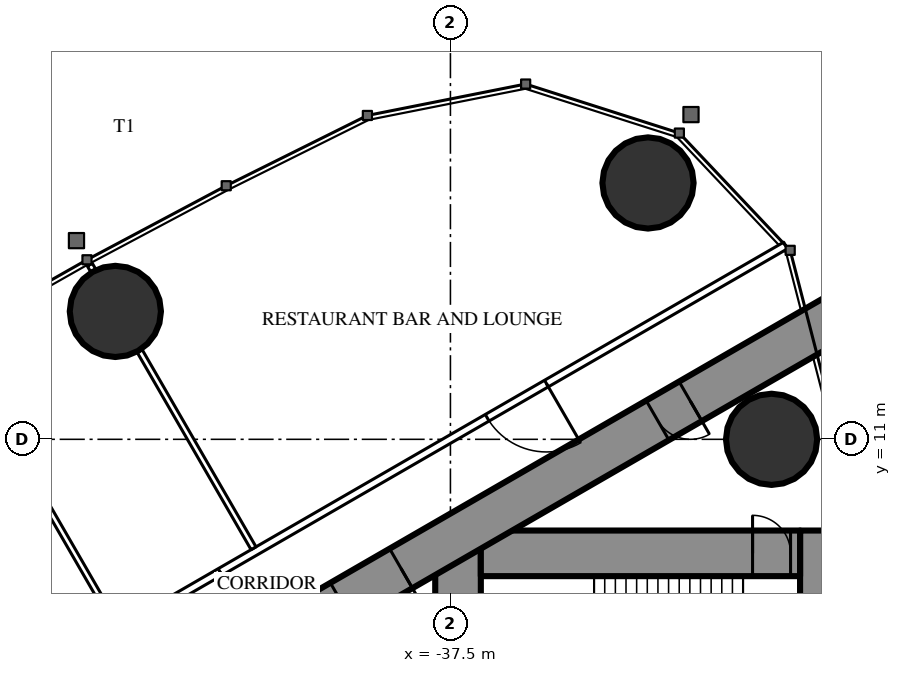
"""IFC4 building model, lengths in metres.
Left out: names, types, materials, properties, quantities, classifications, styles, units other than length and angle.
Written with IfcOpenShell. Run it as: python <this file> out.ifc"""

import sys

from ifc_helpers import new_model, si_unit, direction, frame, frame_2d, origin, origin_2d, place, context, subcontext, project, spatial, rectangle, circle, extrude, element, fill, save


model = new_model("IFC4")
c1 = context("Model", 3, precision=1e-05, world=origin(), true_north=direction((0.0, 1.0)))
c2 = subcontext(c1, "Body", "Model", "MODEL_VIEW")
j1 = project(units=[si_unit("LENGTHUNIT", "METRE"), si_unit("PLANEANGLEUNIT", "RADIAN")], contexts=[c1])
p1 = place(None, origin())
s1 = spatial("IfcSite", under=j1, at=p1, CompositionType="ELEMENT")
p2 = place(p1, origin())
s2 = spatial("IfcBuilding", under=s1, at=p2, CompositionType="ELEMENT")
p3 = place(p2, frame((0.0, 0.0, 251.9)))
s3 = spatial("IfcBuildingStorey", under=s2, at=p3, CompositionType="ELEMENT", Elevation=251.9)
for number, where, z_axis, x_axis in (
    (1, (-32.301, 17.745, 0.0), (0.0, 0.0, 1.0), (1.0, 0.0, 0.0)),
    (2, (-29.05, 11.0, 0.0), (0.0, 0.0, 1.0), (1.0, 0.0, 0.0)),
    (3, (-46.317, 14.365, 0.0), (0.0, 0.0, 1.0), (1.0, 0.0, 0.0)),
):
    element("IfcColumn", number, at=place(p3, frame(where, z_axis=z_axis, x_axis=x_axis)), inside=s3, PredefinedType="COLUMN", context=c2, shape_type="SweptSolid", body=[
        extrude(circle(Radius=1.2, at=origin_2d()), origin(), (0.0, 0.0, 1.0), 5.4),
    ])
p4 = place(p3, frame((-27.9, 8.6, 0.0), z_axis=(0.0, 0.0, 1.0), x_axis=(0.0, -1.0, 0.0)))
e4 = element("IfcWall", 4, at=p4, inside=s3, PredefinedType="SHEAR", context=c2, shape_type="SweptSolid", body=[
    extrude(rectangle(XDim=17.2, YDim=0.8, at=frame_2d((8.6, 0.0))), origin(), (0.0, 0.0, 1.0), 5.4),
])
p5 = place(p4, frame((6.95, 0.0, 0.0)))
e5 = element("IfcOpeningElement", 5, at=p5, cuts=e4, PredefinedType="OPENING", context=c2, shape_type="SweptSolid", body=[
    extrude(rectangle(XDim=0.9, YDim=2.2, at=frame_2d((0.45, 1.1))), frame((0.0, 0.41, 0.0), z_axis=(0.0, -1.0, 0.0), x_axis=(1.0, 0.0, 0.0)), (0.0, 0.0, 1.0), 0.82),
])
p6 = place(p3, frame((-37.3, 8.6, 0.0), z_axis=(0.0, 0.0, 1.0), x_axis=(0.0, -1.0, 0.0)))
e6 = element("IfcWall", 6, at=p6, inside=s3, PredefinedType="SHEAR", context=c2, shape_type="SweptSolid", body=[
    extrude(rectangle(XDim=17.2, YDim=1.2, at=frame_2d((8.6, 0.0))), origin(), (0.0, 0.0, 1.0), 5.4),
])
p7 = place(p6, frame((7.7, 0.0, 0.0)))
e7 = element("IfcOpeningElement", 7, at=p7, cuts=e6, PredefinedType="OPENING", context=c2, shape_type="SweptSolid", body=[
    extrude(rectangle(XDim=1.8, YDim=2.2, at=frame_2d((0.9, 1.1))), frame((0.0, 0.61, 0.0), z_axis=(0.0, -1.0, 0.0), x_axis=(1.0, 0.0, 0.0)), (0.0, 0.0, 1.0), 1.22),
])
p8 = place(p3, frame((-28.3, 8.0, 0.0), z_axis=(0.0, 0.0, 1.0), x_axis=(-1.0, 0.0, 0.0)))
e8 = element("IfcWall", 8, at=p8, inside=s3, PredefinedType="SHEAR", context=c2, shape_type="SweptSolid", body=[
    extrude(rectangle(XDim=8.4, YDim=1.2, at=frame_2d((4.2, 0.0))), origin(), (0.0, 0.0, 1.0), 5.4),
])
p9 = place(p8, frame((0.25, 0.0, 0.0)))
e9 = element("IfcOpeningElement", 9, at=p9, cuts=e8, PredefinedType="OPENING", context=c2, shape_type="SweptSolid", body=[
    extrude(rectangle(XDim=1.0, YDim=2.2, at=frame_2d((0.5, 1.1))), frame((0.0, 0.61, 0.0), z_axis=(0.0, -1.0, 0.0), x_axis=(1.0, 0.0, 0.0)), (0.0, 0.0, 1.0), 1.22),
])
p10 = place(p3, frame((-27.2, 14.3, 0.0), z_axis=(0.0, 0.0, 1.0), x_axis=(-0.866026593062, -0.499997940104, 0.0)))
e10 = element("IfcWall", 10, at=p10, inside=s3, PredefinedType="SHEAR", context=c2, shape_type="SweptSolid", body=[
    extrude(rectangle(XDim=28.946, YDim=1.2, at=frame_2d((14.473, 0.0))), origin(), (0.0, 0.0, 1.0), 5.4),
])
p11 = place(p10, frame((4.6, 0.0, 0.0)))
e11 = element("IfcOpeningElement", 11, at=p11, cuts=e10, PredefinedType="OPENING", context=c2, shape_type="SweptSolid", body=[
    extrude(rectangle(XDim=1.0, YDim=2.2, at=frame_2d((0.5, 1.1))), frame((0.0, 0.61, 0.0), z_axis=(0.0, -1.0, 0.0), x_axis=(1.0, 0.0, 0.0)), (0.0, 0.0, 1.0), 1.22),
])
p12 = place(p10, frame((13.395, 0.0, 0.0)))
e12 = element("IfcOpeningElement", 12, at=p12, cuts=e10, PredefinedType="OPENING", context=c2, shape_type="SweptSolid", body=[
    extrude(rectangle(XDim=1.8, YDim=2.2, at=frame_2d((0.9, 1.1))), frame((0.0, 0.61, 0.0), z_axis=(0.0, -1.0, 0.0), x_axis=(1.0, 0.0, 0.0)), (0.0, 0.0, 1.0), 1.22),
])
p13 = place(p3, frame((-28.681, 16.101, 0.0), z_axis=(0.0, 0.0, 1.0), x_axis=(-0.866024860443, -0.500000941094, 0.0)))
e13 = element("IfcWall", 13, at=p13, inside=s3, PredefinedType="PARTITIONING", context=c2, shape_type="SweptSolid", body=[
    extrude(rectangle(XDim=32.201, YDim=0.2, at=frame_2d((16.101, 0.0))), origin(), (0.0, 0.0, 1.0), 5.15),
])
p14 = place(p13, frame((7.266, 0.0, 0.0)))
e14 = element("IfcOpeningElement", 14, at=p14, cuts=e13, PredefinedType="OPENING", context=c2, shape_type="SweptSolid", body=[
    extrude(rectangle(XDim=1.8, YDim=2.2, at=frame_2d((0.9, 1.1))), frame((0.0, 0.11, 0.0), z_axis=(0.0, -1.0, 0.0), x_axis=(1.0, 0.0, 0.0)), (0.0, 0.0, 1.0), 0.22),
])
p15 = place(p13, frame((17.182, 0.0, 0.0)))
e15 = element("IfcOpeningElement", 15, at=p15, cuts=e13, PredefinedType="OPENING", context=c2, shape_type="SweptSolid", body=[
    extrude(rectangle(XDim=2.0, YDim=2.4, at=frame_2d((1.0, 1.2))), frame((0.0, 0.11, 0.0), z_axis=(0.0, -1.0, 0.0), x_axis=(1.0, 0.0, 0.0)), (0.0, 0.0, 1.0), 0.22),
])
p16 = place(p13, frame((21.43, 0.0, 0.0)))
e16 = element("IfcOpeningElement", 16, at=p16, cuts=e13, PredefinedType="OPENING", context=c2, shape_type="SweptSolid", body=[
    extrude(rectangle(XDim=1.8, YDim=2.2, at=frame_2d((0.9, 1.1))), frame((0.0, 0.11, 0.0), z_axis=(0.0, -1.0, 0.0), x_axis=(1.0, 0.0, 0.0)), (0.0, 0.0, 1.0), 0.22),
])
p17 = place(p13, frame((27.29, 0.0, 0.0)))
e17 = element("IfcOpeningElement", 17, at=p17, cuts=e13, PredefinedType="OPENING", context=c2, shape_type="SweptSolid", body=[
    extrude(rectangle(XDim=1.8, YDim=2.2, at=frame_2d((0.9, 1.1))), frame((0.0, 0.11, 0.0), z_axis=(0.0, -1.0, 0.0), x_axis=(1.0, 0.0, 0.0)), (0.0, 0.0, 1.0), 0.22),
])
p18 = place(p3, frame((-42.68, 8.134, 0.0), z_axis=(0.0, 0.0, 1.0), x_axis=(-0.499984479505, 0.866034364361, 0.0)))
e18 = element("IfcWall", 18, at=p18, inside=s3, PredefinedType="PARTITIONING", context=c2, shape_type="SweptSolid", body=[
    extrude(rectangle(XDim=5.995, YDim=0.15, at=frame_2d((2.998, 0.0))), origin(), (0.0, 0.0, 1.0), 4.25),
])
p19 = place(p3, frame((-46.898, 15.439, 0.0), z_axis=(0.0, 0.0, 1.0), x_axis=(-0.500232303069, 0.865891241997, 0.0)))
e19 = element("IfcWall", 19, at=p19, inside=s3, PredefinedType="PARTITIONING", context=c2, shape_type="SweptSolid", body=[
    extrude(rectangle(XDim=0.18, YDim=0.15, at=frame_2d((0.09, 0.0))), origin(), (0.0, 0.0, 1.0), 4.25),
])
p20 = place(p3, frame((-46.274, 6.059, 0.0), z_axis=(0.0, 0.0, 1.0), x_axis=(-0.500020471368, 0.866013584312, 0.0)))
e20 = element("IfcWall", 20, at=p20, inside=s3, PredefinedType="PARTITIONING", context=c2, shape_type="SweptSolid", body=[
    extrude(rectangle(XDim=6.028, YDim=0.15, at=frame_2d((3.014, 0.0))), origin(), (0.0, 0.0, 1.0), 4.25),
])
p21 = place(p14, origin())
e21 = element("IfcDoor", 21, at=p21, inside=s3, OperationType="DOUBLE_DOOR_SINGLE_SWING", PredefinedType="DOOR", context=c2, shape_type="SweptSolid", body=[
    extrude(rectangle(XDim=1.8, YDim=2.2, at=frame_2d((0.9, 1.1))), frame((0.0, 0.025, 0.0), z_axis=(0.0, -1.0, 0.0), x_axis=(1.0, 0.0, 0.0)), (0.0, 0.0, 1.0), 0.05),
])
fill(e14, e21)
p22 = place(p15, origin())
e22 = element("IfcDoor", 22, at=p22, inside=s3, OperationType="DOUBLE_DOOR_SINGLE_SWING", PredefinedType="DOOR", context=c2, shape_type="SweptSolid", body=[
    extrude(rectangle(XDim=2.0, YDim=2.4, at=frame_2d((1.0, 1.2))), frame((0.0, 0.025, 0.0), z_axis=(0.0, -1.0, 0.0), x_axis=(1.0, 0.0, 0.0)), (0.0, 0.0, 1.0), 0.05),
])
fill(e15, e22)
p23 = place(p11, origin())
e23 = element("IfcDoor", 23, at=p23, inside=s3, OperationType="SINGLE_SWING_LEFT", PredefinedType="DOOR", context=c2, shape_type="SweptSolid", body=[
    extrude(rectangle(XDim=1.0, YDim=2.2, at=frame_2d((0.5, 1.1))), frame((0.0, 0.025, 0.0), z_axis=(0.0, -1.0, 0.0), x_axis=(1.0, 0.0, 0.0)), (0.0, 0.0, 1.0), 0.05),
])
fill(e11, e23)
p24 = place(p12, origin())
e24 = element("IfcDoor", 24, at=p24, inside=s3, OperationType="DOUBLE_DOOR_SINGLE_SWING", PredefinedType="DOOR", context=c2, shape_type="SweptSolid", body=[
    extrude(rectangle(XDim=1.8, YDim=2.2, at=frame_2d((0.9, 1.1))), frame((0.0, 0.025, 0.0), z_axis=(0.0, -1.0, 0.0), x_axis=(1.0, 0.0, 0.0)), (0.0, 0.0, 1.0), 0.05),
])
fill(e12, e24)
p25 = place(p9, origin())
e25 = element("IfcDoor", 25, at=p25, inside=s3, OperationType="SINGLE_SWING_RIGHT", PredefinedType="DOOR", context=c2, shape_type="SweptSolid", body=[
    extrude(rectangle(XDim=1.0, YDim=2.2, at=frame_2d((0.5, 1.1))), frame((0.0, 0.025, 0.0), z_axis=(0.0, -1.0, 0.0), x_axis=(1.0, 0.0, 0.0)), (0.0, 0.0, 1.0), 0.05),
])
fill(e9, e25)
save(model, sys.argv[1])
